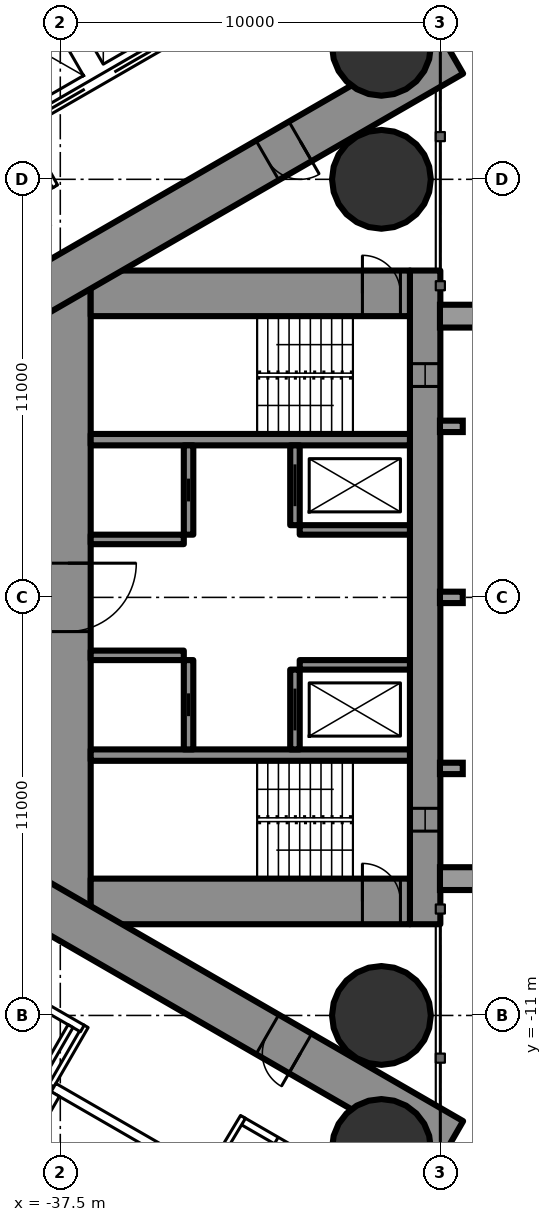
"""IFC4 building model, lengths in metres.
Left out: names, types, materials, properties, quantities, classifications, styles, units other than length and angle.
Written with IfcOpenShell. Run it as: python <this file> out.ifc"""

import sys

from ifc_helpers import new_model, si_unit, direction, frame, frame_2d, origin, origin_2d, place, context, subcontext, project, spatial, rectangle, hollow_circle, extrude, element, fill, save


model = new_model("IFC4")
c1 = context("Model", 3, precision=1e-05, world=origin(), true_north=direction((0.0, 1.0)))
c2 = subcontext(c1, "Body", "Model", "MODEL_VIEW")
j1 = project(units=[si_unit("LENGTHUNIT", "METRE"), si_unit("PLANEANGLEUNIT", "RADIAN")], contexts=[c1])
p1 = place(None, origin())
s1 = spatial("IfcSite", under=j1, at=p1, CompositionType="ELEMENT")
p2 = place(p1, origin())
s2 = spatial("IfcBuilding", under=s1, at=p2, CompositionType="ELEMENT")
p3 = place(p2, frame((0.0, 0.0, 132.6)))
s3 = spatial("IfcBuildingStorey", under=s2, at=p3, CompositionType="ELEMENT", Elevation=132.6)
for number, where, z_axis, x_axis in (
    (1, (-29.05, -11.0, 0.0), (0.0, 0.0, 1.0), (1.0, 0.0, 0.0)),
    (2, (-29.05, 11.0, 0.0), (0.0, 0.0, 1.0), (1.0, 0.0, 0.0)),
    (3, (-29.05, 14.5, 0.0), (0.0, 0.0, 1.0), (1.0, 0.0, 0.0)),
    (4, (-29.05, -14.5, 0.0), (0.0, 0.0, 1.0), (1.0, 0.0, 0.0)),
):
    element("IfcColumn", number, at=place(p3, frame(where, z_axis=z_axis, x_axis=x_axis)), inside=s3, PredefinedType="COLUMN", context=c2, shape_type="SweptSolid", body=[
        extrude(hollow_circle(Radius=1.3, WallThickness=0.1, at=origin_2d()), origin(), (0.0, 0.0, 1.0), 3.5),
    ])
p4 = place(p3, frame((-27.9, 8.6, 0.0), z_axis=(0.0, 0.0, 1.0), x_axis=(0.0, -1.0, 0.0)))
e5 = element("IfcWall", 5, at=p4, inside=s3, PredefinedType="SHEAR", context=c2, shape_type="SweptSolid", body=[
    extrude(rectangle(XDim=17.2, YDim=0.8, at=frame_2d((8.6, 0.0))), origin(), (0.0, 0.0, 1.0), 3.5),
])
p5 = place(p4, frame((2.45, 0.0, 0.6)))
e6 = element("IfcOpeningElement", 6, at=p5, cuts=e5, PredefinedType="OPENING", context=c2, shape_type="SweptSolid", body=[
    extrude(rectangle(XDim=0.6, YDim=2.1, at=frame_2d((0.3, 1.05))), frame((0.0, 0.41, 0.0), z_axis=(0.0, -1.0, 0.0), x_axis=(1.0, 0.0, 0.0)), (0.0, 0.0, 1.0), 0.82),
])
p6 = place(p4, frame((14.15, 0.0, 0.6)))
e7 = element("IfcOpeningElement", 7, at=p6, cuts=e5, PredefinedType="OPENING", context=c2, shape_type="SweptSolid", body=[
    extrude(rectangle(XDim=0.6, YDim=2.1, at=frame_2d((0.3, 1.05))), frame((0.0, 0.41, 0.0), z_axis=(0.0, -1.0, 0.0), x_axis=(1.0, 0.0, 0.0)), (0.0, 0.0, 1.0), 0.82),
])
p7 = place(p3, frame((-37.3, 8.6, 0.0), z_axis=(0.0, 0.0, 1.0), x_axis=(0.0, -1.0, 0.0)))
e8 = element("IfcWall", 8, at=p7, inside=s3, PredefinedType="SHEAR", context=c2, shape_type="SweptSolid", body=[
    extrude(rectangle(XDim=17.2, YDim=1.2, at=frame_2d((8.6, 0.0))), origin(), (0.0, 0.0, 1.0), 3.5),
])
p8 = place(p7, frame((7.7, 0.0, 0.0)))
e9 = element("IfcOpeningElement", 9, at=p8, cuts=e8, PredefinedType="OPENING", context=c2, shape_type="SweptSolid", body=[
    extrude(rectangle(XDim=1.8, YDim=2.2, at=frame_2d((0.9, 1.1))), frame((0.0, 0.61, 0.0), z_axis=(0.0, -1.0, 0.0), x_axis=(1.0, 0.0, 0.0)), (0.0, 0.0, 1.0), 1.22),
])
p9 = place(p3, frame((-28.3, 8.0, 0.0), z_axis=(0.0, 0.0, 1.0), x_axis=(-1.0, 0.0, 0.0)))
e10 = element("IfcWall", 10, at=p9, inside=s3, PredefinedType="SHEAR", context=c2, shape_type="SweptSolid", body=[
    extrude(rectangle(XDim=8.4, YDim=1.2, at=frame_2d((4.2, 0.0))), origin(), (0.0, 0.0, 1.0), 3.5),
])
p10 = place(p9, frame((0.25, 0.0, 0.0)))
e11 = element("IfcOpeningElement", 11, at=p10, cuts=e10, PredefinedType="OPENING", context=c2, shape_type="SweptSolid", body=[
    extrude(rectangle(XDim=1.0, YDim=2.2, at=frame_2d((0.5, 1.1))), frame((0.0, 0.61, 0.0), z_axis=(0.0, -1.0, 0.0), x_axis=(1.0, 0.0, 0.0)), (0.0, 0.0, 1.0), 1.22),
])
p11 = place(p3, frame((-28.3, -8.0, 0.0), z_axis=(0.0, 0.0, 1.0), x_axis=(-1.0, 0.0, 0.0)))
e12 = element("IfcWall", 12, at=p11, inside=s3, PredefinedType="SHEAR", context=c2, shape_type="SweptSolid", body=[
    extrude(rectangle(XDim=8.4, YDim=1.2, at=frame_2d((4.2, 0.0))), origin(), (0.0, 0.0, 1.0), 3.5),
])
p12 = place(p11, frame((0.25, 0.0, 0.0)))
e13 = element("IfcOpeningElement", 13, at=p12, cuts=e12, PredefinedType="OPENING", context=c2, shape_type="SweptSolid", body=[
    extrude(rectangle(XDim=1.0, YDim=2.2, at=frame_2d((0.5, 1.1))), frame((0.0, 0.61, 0.0), z_axis=(0.0, -1.0, 0.0), x_axis=(1.0, 0.0, 0.0)), (0.0, 0.0, 1.0), 1.22),
])
for number, where, z_axis, x_axis in (
    (14, (-28.3, 4.15, 0.0), (0.0, 0.0, 1.0), (-1.0, 0.0, 0.0)),
    (15, (-28.3, -4.15, 0.0), (0.0, 0.0, 1.0), (-1.0, 0.0, 0.0)),
):
    element("IfcWall", number, at=place(p3, frame(where, z_axis=z_axis, x_axis=x_axis)), inside=s3, PredefinedType="SHEAR", context=c2, shape_type="SweptSolid", body=[
        extrude(rectangle(XDim=8.4, YDim=0.3, at=frame_2d((4.2, 0.0))), origin(), (0.0, 0.0, 1.0), 3.5),
    ])
p13 = place(p3, frame((-31.325, 4.0, 0.0), z_axis=(0.0, 0.0, 1.0), x_axis=(0.0, -1.0, 0.0)))
e16 = element("IfcWall", 16, at=p13, inside=s3, PredefinedType="SHEAR", context=c2, shape_type="SweptSolid", body=[
    extrude(rectangle(XDim=2.1, YDim=0.25, at=frame_2d((1.05, 0.0))), origin(), (0.0, 0.0, 1.0), 3.5),
])
p14 = place(p13, frame((0.5, 0.0, 0.0)))
e17 = element("IfcOpeningElement", 17, at=p14, cuts=e16, PredefinedType="OPENING", context=c2, shape_type="SweptSolid", body=[
    extrude(rectangle(XDim=1.1, YDim=2.2, at=frame_2d((0.55, 1.1))), frame((0.0, 0.135, 0.0), z_axis=(0.0, -1.0, 0.0), x_axis=(1.0, 0.0, 0.0)), (0.0, 0.0, 1.0), 0.27),
])
p15 = place(p3, frame((-34.125, 4.0, 0.0), z_axis=(0.0, 0.0, 1.0), x_axis=(0.0, -1.0, 0.0)))
e18 = element("IfcWall", 18, at=p15, inside=s3, PredefinedType="SHEAR", context=c2, shape_type="SweptSolid", body=[
    extrude(rectangle(XDim=2.35, YDim=0.25, at=frame_2d((1.175, 0.0))), origin(), (0.0, 0.0, 1.0), 3.5),
])
p16 = place(p15, frame((0.875, 0.0, 0.0)))
e19 = element("IfcOpeningElement", 19, at=p16, cuts=e18, PredefinedType="OPENING", context=c2, shape_type="SweptSolid", body=[
    extrude(rectangle(XDim=0.6, YDim=2.0, at=frame_2d((0.3, 1.0))), frame((0.0, 0.135, 0.0), z_axis=(0.0, -1.0, 0.0), x_axis=(1.0, 0.0, 0.0)), (0.0, 0.0, 1.0), 0.27),
])
p17 = place(p3, frame((-28.3, 1.775, 0.0), z_axis=(0.0, 0.0, 1.0), x_axis=(-1.0, 0.0, 0.0)))
e20 = element("IfcWall", 20, at=p17, inside=s3, PredefinedType="SHEAR", context=c2, shape_type="SweptSolid", body=[
    extrude(rectangle(XDim=2.9, YDim=0.25, at=frame_2d((1.45, 0.0))), origin(), (0.0, 0.0, 1.0), 3.5),
])
p18 = place(p3, frame((-34.25, 1.525, 0.0), z_axis=(0.0, 0.0, 1.0), x_axis=(-1.0, 0.0, 0.0)))
e21 = element("IfcWall", 21, at=p18, inside=s3, PredefinedType="SHEAR", context=c2, shape_type="SweptSolid", body=[
    extrude(rectangle(XDim=2.45, YDim=0.25, at=frame_2d((1.225, 0.0))), origin(), (0.0, 0.0, 1.0), 3.5),
])
p19 = place(p3, frame((-31.325, -1.9, 0.0), z_axis=(0.0, 0.0, 1.0), x_axis=(0.0, -1.0, 0.0)))
e22 = element("IfcWall", 22, at=p19, inside=s3, PredefinedType="SHEAR", context=c2, shape_type="SweptSolid", body=[
    extrude(rectangle(XDim=2.1, YDim=0.25, at=frame_2d((1.05, 0.0))), origin(), (0.0, 0.0, 1.0), 3.5),
])
p20 = place(p19, frame((0.5, 0.0, 0.0)))
e23 = element("IfcOpeningElement", 23, at=p20, cuts=e22, PredefinedType="OPENING", context=c2, shape_type="SweptSolid", body=[
    extrude(rectangle(XDim=1.1, YDim=2.2, at=frame_2d((0.55, 1.1))), frame((0.0, 0.135, 0.0), z_axis=(0.0, -1.0, 0.0), x_axis=(1.0, 0.0, 0.0)), (0.0, 0.0, 1.0), 0.27),
])
p21 = place(p3, frame((-34.125, -1.65, 0.0), z_axis=(0.0, 0.0, 1.0), x_axis=(0.0, -1.0, 0.0)))
e24 = element("IfcWall", 24, at=p21, inside=s3, PredefinedType="SHEAR", context=c2, shape_type="SweptSolid", body=[
    extrude(rectangle(XDim=2.35, YDim=0.25, at=frame_2d((1.175, 0.0))), origin(), (0.0, 0.0, 1.0), 3.5),
])
p22 = place(p21, frame((0.875, 0.0, 0.0)))
e25 = element("IfcOpeningElement", 25, at=p22, cuts=e24, PredefinedType="OPENING", context=c2, shape_type="SweptSolid", body=[
    extrude(rectangle(XDim=0.6, YDim=2.0, at=frame_2d((0.3, 1.0))), frame((0.0, 0.135, 0.0), z_axis=(0.0, -1.0, 0.0), x_axis=(1.0, 0.0, 0.0)), (0.0, 0.0, 1.0), 0.27),
])
p23 = place(p3, frame((-28.3, -1.775, 0.0), z_axis=(0.0, 0.0, 1.0), x_axis=(-1.0, 0.0, 0.0)))
e26 = element("IfcWall", 26, at=p23, inside=s3, PredefinedType="SHEAR", context=c2, shape_type="SweptSolid", body=[
    extrude(rectangle(XDim=2.9, YDim=0.25, at=frame_2d((1.45, 0.0))), origin(), (0.0, 0.0, 1.0), 3.5),
])
p24 = place(p3, frame((-34.25, -1.525, 0.0), z_axis=(0.0, 0.0, 1.0), x_axis=(-1.0, 0.0, 0.0)))
e27 = element("IfcWall", 27, at=p24, inside=s3, PredefinedType="SHEAR", context=c2, shape_type="SweptSolid", body=[
    extrude(rectangle(XDim=2.45, YDim=0.25, at=frame_2d((1.225, 0.0))), origin(), (0.0, 0.0, 1.0), 3.5),
])
p25 = place(p3, frame((-27.2, 14.3, 0.0), z_axis=(0.0, 0.0, 1.0), x_axis=(-0.866026593062, -0.499997940104, 0.0)))
e28 = element("IfcWall", 28, at=p25, inside=s3, PredefinedType="SHEAR", context=c2, shape_type="SweptSolid", body=[
    extrude(rectangle(XDim=28.946, YDim=1.2, at=frame_2d((14.473, 0.0))), origin(), (0.0, 0.0, 1.0), 3.5),
])
p26 = place(p25, frame((4.6, 0.0, 0.0)))
e29 = element("IfcOpeningElement", 29, at=p26, cuts=e28, PredefinedType="OPENING", context=c2, shape_type="SweptSolid", body=[
    extrude(rectangle(XDim=1.0, YDim=2.2, at=frame_2d((0.5, 1.1))), frame((0.0, 0.61, 0.0), z_axis=(0.0, -1.0, 0.0), x_axis=(1.0, 0.0, 0.0)), (0.0, 0.0, 1.0), 1.22),
])
p27 = place(p25, frame((13.395, 0.0, 0.0)))
e30 = element("IfcOpeningElement", 30, at=p27, cuts=e28, PredefinedType="OPENING", context=c2, shape_type="SweptSolid", body=[
    extrude(rectangle(XDim=1.8, YDim=2.2, at=frame_2d((0.9, 1.1))), frame((0.0, 0.61, 0.0), z_axis=(0.0, -1.0, 0.0), x_axis=(1.0, 0.0, 0.0)), (0.0, 0.0, 1.0), 1.22),
])
p28 = place(p3, frame((-27.2, -14.3, 0.0), z_axis=(0.0, 0.0, 1.0), x_axis=(-0.866024021859, 0.500002393557, 0.0)))
e31 = element("IfcWall", 31, at=p28, inside=s3, PredefinedType="SHEAR", context=c2, shape_type="SweptSolid", body=[
    extrude(rectangle(XDim=27.907, YDim=1.2, at=frame_2d((13.954, 0.0))), origin(), (0.0, 0.0, 1.0), 3.5),
])
p29 = place(p28, frame((4.6, 0.0, 0.0)))
e32 = element("IfcOpeningElement", 32, at=p29, cuts=e31, PredefinedType="OPENING", context=c2, shape_type="SweptSolid", body=[
    extrude(rectangle(XDim=1.0, YDim=2.2, at=frame_2d((0.5, 1.1))), frame((0.0, 0.61, 0.0), z_axis=(0.0, -1.0, 0.0), x_axis=(1.0, 0.0, 0.0)), (0.0, 0.0, 1.0), 1.22),
])
p30 = place(p28, frame((13.395, 0.0, 0.0)))
e33 = element("IfcOpeningElement", 33, at=p30, cuts=e31, PredefinedType="OPENING", context=c2, shape_type="SweptSolid", body=[
    extrude(rectangle(XDim=1.8, YDim=2.2, at=frame_2d((0.9, 1.1))), frame((0.0, 0.61, 0.0), z_axis=(0.0, -1.0, 0.0), x_axis=(1.0, 0.0, 0.0)), (0.0, 0.0, 1.0), 1.22),
])
p31 = place(p3, frame((-37.7, 10.894, 0.0), z_axis=(0.0, 0.0, 1.0), x_axis=(-0.866027905338, -0.499995667157, 0.0)))
e34 = element("IfcWall", 34, at=p31, inside=s3, PredefinedType="PARTITIONING", context=c2, shape_type="SweptSolid", body=[
    extrude(rectangle(XDim=21.787, YDim=0.2, at=frame_2d((10.894, 0.0))), origin(), (0.0, 0.0, 1.0), 3.25),
])
p32 = place(p31, frame((17.711, 0.0, 0.0)))
e35 = element("IfcOpeningElement", 35, at=p32, cuts=e34, PredefinedType="OPENING", context=c2, shape_type="SweptSolid", body=[
    extrude(rectangle(XDim=0.95, YDim=2.2, at=frame_2d((0.475, 1.1))), frame((0.0, 0.11, 0.0), z_axis=(0.0, -1.0, 0.0), x_axis=(1.0, 0.0, 0.0)), (0.0, 0.0, 1.0), 0.22),
])
p33 = place(p31, frame((19.399, 0.0, 0.0)))
e36 = element("IfcOpeningElement", 36, at=p33, cuts=e34, PredefinedType="OPENING", context=c2, shape_type="SweptSolid", body=[
    extrude(rectangle(XDim=1.8, YDim=2.2, at=frame_2d((0.9, 1.1))), frame((0.0, 0.11, 0.0), z_axis=(0.0, -1.0, 0.0), x_axis=(1.0, 0.0, 0.0)), (0.0, 0.0, 1.0), 0.22),
])
p34 = place(p31, frame((0.6, 0.0, 0.0)))
e37 = element("IfcOpeningElement", 37, at=p34, cuts=e34, PredefinedType="OPENING", context=c2, shape_type="SweptSolid", body=[
    extrude(rectangle(XDim=0.95, YDim=2.2, at=frame_2d((0.475, 1.1))), frame((0.0, 0.11, 0.0), z_axis=(0.0, -1.0, 0.0), x_axis=(1.0, 0.0, 0.0)), (0.0, 0.0, 1.0), 0.22),
])
p35 = place(p3, frame((-27.572, -16.741, 0.0), z_axis=(0.0, 0.0, 1.0), x_axis=(-0.866024464444, 0.500001626982, 0.0)))
e38 = element("IfcWall", 38, at=p35, inside=s3, PredefinedType="PARTITIONING", context=c2, shape_type="SweptSolid", body=[
    extrude(rectangle(XDim=5.955, YDim=0.2, at=frame_2d((2.978, 0.0))), origin(), (0.0, 0.0, 1.0), 3.25),
])
p36 = place(p35, frame((3.95, 0.0, 0.0)))
e39 = element("IfcOpeningElement", 39, at=p36, cuts=e38, PredefinedType="OPENING", context=c2, shape_type="SweptSolid", body=[
    extrude(rectangle(XDim=0.95, YDim=2.2, at=frame_2d((0.475, 1.1))), frame((0.0, 0.11, 0.0), z_axis=(0.0, -1.0, 0.0), x_axis=(1.0, 0.0, 0.0)), (0.0, 0.0, 1.0), 0.22),
])
p37 = place(p3, frame((-38.513, 12.392, 0.0), z_axis=(0.0, 0.0, 1.0), x_axis=(0.485585508183, -0.874189175317, 0.0)))
e40 = element("IfcWall", 40, at=p37, inside=s3, PredefinedType="PARTITIONING", context=c2, shape_type="SweptSolid", body=[
    extrude(rectangle(XDim=1.805, YDim=0.15, at=frame_2d((0.902, 0.0))), origin(), (0.0, 0.0, 1.0), 3.25),
])
p38 = place(p3, frame((-36.831, -11.28, 0.0), z_axis=(0.0, 0.0, 1.0), x_axis=(-0.499937177781, -0.866061671171, 0.0)))
e41 = element("IfcWall", 41, at=p38, inside=s3, PredefinedType="PARTITIONING", context=c2, shape_type="SweptSolid", body=[
    extrude(rectangle(XDim=1.804, YDim=0.15, at=frame_2d((0.902, 0.0))), origin(), (0.0, 0.0, 1.0), 3.25),
])
p39 = place(p3, frame((-33.621, -15.218, 0.0), z_axis=(0.0, 0.0, 1.0), x_axis=(0.514336634837, 0.857588377991, 0.0)))
e42 = element("IfcWall", 42, at=p39, inside=s3, PredefinedType="PARTITIONING", context=c2, shape_type="SweptSolid", body=[
    extrude(rectangle(XDim=1.805, YDim=0.15, at=frame_2d((0.903, 0.0))), origin(), (0.0, 0.0, 1.0), 3.25),
])
p40 = place(p3, frame((-36.92, -11.344, 0.0), z_axis=(0.0, 0.0, 1.0), x_axis=(-0.866027897759, 0.499995680284, 0.0)))
e43 = element("IfcWall", 43, at=p40, inside=s3, PredefinedType="PARTITIONING", context=c2, shape_type="SweptSolid", body=[
    extrude(rectangle(XDim=11.731, YDim=0.2, at=frame_2d((5.865, 0.0))), origin(), (0.0, 0.0, 1.0), 3.25),
])
p41 = place(p40, frame((3.35, 0.0, 0.0)))
e44 = element("IfcOpeningElement", 44, at=p41, cuts=e43, PredefinedType="OPENING", context=c2, shape_type="SweptSolid", body=[
    extrude(rectangle(XDim=1.0, YDim=2.2, at=frame_2d((0.5, 1.1))), frame((0.0, 0.11, 0.0), z_axis=(0.0, -1.0, 0.0), x_axis=(1.0, 0.0, 0.0)), (0.0, 0.0, 1.0), 0.22),
])
p42 = place(p3, frame((-37.23, -11.281, 0.0), z_axis=(0.0, 0.0, 1.0), x_axis=(-0.500049511043, -0.865996816683, 0.0)))
e45 = element("IfcWall", 45, at=p42, inside=s3, PredefinedType="PARTITIONING", context=c2, shape_type="SweptSolid", body=[
    extrude(rectangle(XDim=2.8, YDim=0.15, at=frame_2d((1.4, 0.0))), origin(), (0.0, 0.0, 1.0), 3.25),
])
p43 = place(p3, frame((-31.01, 16.747, 0.0), z_axis=(0.0, 0.0, 1.0), x_axis=(-0.866028165386, -0.499995216735, 0.0)))
e46 = element("IfcWall", 46, at=p43, inside=s3, PredefinedType="PARTITIONING", context=c2, shape_type="SweptSolid", body=[
    extrude(rectangle(XDim=8.6, YDim=0.25, at=frame_2d((4.3, 0.0))), origin(), (0.0, 0.0, 1.0), 3.25),
])
p44 = place(p43, frame((0.75, 0.0, 0.0)))
e47 = element("IfcOpeningElement", 47, at=p44, cuts=e46, PredefinedType="OPENING", context=c2, shape_type="SweptSolid", body=[
    extrude(rectangle(XDim=1.1, YDim=2.2, at=frame_2d((0.55, 1.1))), frame((0.0, 0.135, 0.0), z_axis=(0.0, -1.0, 0.0), x_axis=(1.0, 0.0, 0.0)), (0.0, 0.0, 1.0), 0.27),
])
p45 = place(p43, frame((2.75, 0.0, 0.0)))
e48 = element("IfcOpeningElement", 48, at=p45, cuts=e46, PredefinedType="OPENING", context=c2, shape_type="SweptSolid", body=[
    extrude(rectangle(XDim=1.1, YDim=2.2, at=frame_2d((0.55, 1.1))), frame((0.0, 0.135, 0.0), z_axis=(0.0, -1.0, 0.0), x_axis=(1.0, 0.0, 0.0)), (0.0, 0.0, 1.0), 0.27),
])
p46 = place(p43, frame((4.75, 0.0, 0.0)))
e49 = element("IfcOpeningElement", 49, at=p46, cuts=e46, PredefinedType="OPENING", context=c2, shape_type="SweptSolid", body=[
    extrude(rectangle(XDim=1.1, YDim=2.2, at=frame_2d((0.55, 1.1))), frame((0.0, 0.135, 0.0), z_axis=(0.0, -1.0, 0.0), x_axis=(1.0, 0.0, 0.0)), (0.0, 0.0, 1.0), 0.27),
])
p47 = place(p43, frame((6.75, 0.0, 0.0)))
e50 = element("IfcOpeningElement", 50, at=p47, cuts=e46, PredefinedType="OPENING", context=c2, shape_type="SweptSolid", body=[
    extrude(rectangle(XDim=1.1, YDim=2.2, at=frame_2d((0.55, 1.1))), frame((0.0, 0.135, 0.0), z_axis=(0.0, -1.0, 0.0), x_axis=(1.0, 0.0, 0.0)), (0.0, 0.0, 1.0), 0.27),
])
p48 = place(p3, frame((-33.696, -15.197, 0.0), z_axis=(0.0, 0.0, 1.0), x_axis=(-0.865976953817, 0.500083908417, 0.0)))
e51 = element("IfcWall", 51, at=p48, inside=s3, PredefinedType="PARTITIONING", context=c2, shape_type="SweptSolid", body=[
    extrude(rectangle(XDim=4.599, YDim=0.25, at=frame_2d((2.3, 0.0))), origin(), (0.0, 0.0, 1.0), 3.25),
])
p49 = place(p3, frame((-37.633, -13.068, 0.0), z_axis=(0.0, 0.0, 1.0), x_axis=(-0.499872130319, -0.866099216793, 0.0)))
e52 = element("IfcWall", 52, at=p49, inside=s3, PredefinedType="PARTITIONING", context=c2, shape_type="SweptSolid", body=[
    extrude(rectangle(XDim=3.2, YDim=0.25, at=frame_2d((1.6, 0.0))), origin(), (0.0, 0.0, 1.0), 3.25),
])
p50 = place(p36, origin())
e53 = element("IfcDoor", 53, at=p50, inside=s3, OperationType="SINGLE_SWING_LEFT", PredefinedType="DOOR", context=c2, shape_type="SweptSolid", body=[
    extrude(rectangle(XDim=0.95, YDim=2.2, at=frame_2d((0.475, 1.1))), frame((0.0, 0.025, 0.0), z_axis=(0.0, -1.0, 0.0), x_axis=(1.0, 0.0, 0.0)), (0.0, 0.0, 1.0), 0.05),
])
fill(e39, e53)
p51 = place(p26, origin())
e54 = element("IfcDoor", 54, at=p51, inside=s3, OperationType="SINGLE_SWING_LEFT", PredefinedType="DOOR", context=c2, shape_type="SweptSolid", body=[
    extrude(rectangle(XDim=1.0, YDim=2.2, at=frame_2d((0.5, 1.1))), frame((0.0, 0.025, 0.0), z_axis=(0.0, -1.0, 0.0), x_axis=(1.0, 0.0, 0.0)), (0.0, 0.0, 1.0), 0.05),
])
fill(e29, e54)
p52 = place(p29, origin())
e55 = element("IfcDoor", 55, at=p52, inside=s3, OperationType="SINGLE_SWING_LEFT", PredefinedType="DOOR", context=c2, shape_type="SweptSolid", body=[
    extrude(rectangle(XDim=1.0, YDim=2.2, at=frame_2d((0.5, 1.1))), frame((0.0, 0.025, 0.0), z_axis=(0.0, -1.0, 0.0), x_axis=(1.0, 0.0, 0.0)), (0.0, 0.0, 1.0), 0.05),
])
fill(e32, e55)
p53 = place(p8, origin())
e56 = element("IfcDoor", 56, at=p53, inside=s3, OperationType="DOUBLE_DOOR_SINGLE_SWING", PredefinedType="DOOR", context=c2, shape_type="SweptSolid", body=[
    extrude(rectangle(XDim=1.8, YDim=2.2, at=frame_2d((0.9, 1.1))), frame((0.0, 0.025, 0.0), z_axis=(0.0, -1.0, 0.0), x_axis=(1.0, 0.0, 0.0)), (0.0, 0.0, 1.0), 0.05),
])
fill(e9, e56)
p54 = place(p10, origin())
e57 = element("IfcDoor", 57, at=p54, inside=s3, OperationType="SINGLE_SWING_RIGHT", PredefinedType="DOOR", context=c2, shape_type="SweptSolid", body=[
    extrude(rectangle(XDim=1.0, YDim=2.2, at=frame_2d((0.5, 1.1))), frame((0.0, 0.025, 0.0), z_axis=(0.0, -1.0, 0.0), x_axis=(1.0, 0.0, 0.0)), (0.0, 0.0, 1.0), 0.05),
])
fill(e11, e57)
p55 = place(p12, origin())
e58 = element("IfcDoor", 58, at=p55, inside=s3, OperationType="SINGLE_SWING_RIGHT", PredefinedType="DOOR", context=c2, shape_type="SweptSolid", body=[
    extrude(rectangle(XDim=1.0, YDim=2.2, at=frame_2d((0.5, 1.1))), frame((0.0, 0.025, 0.0), z_axis=(0.0, -1.0, 0.0), x_axis=(1.0, 0.0, 0.0)), (0.0, 0.0, 1.0), 0.05),
])
fill(e13, e58)
p56 = place(p14, origin())
e59 = element("IfcDoor", 59, at=p56, inside=s3, OperationType="SLIDING_TO_LEFT", PredefinedType="USERDEFINED", context=c2, shape_type="SweptSolid", body=[
    extrude(rectangle(XDim=1.1, YDim=2.2, at=frame_2d((0.55, 1.1))), frame((0.0, 0.025, 0.0), z_axis=(0.0, -1.0, 0.0), x_axis=(1.0, 0.0, 0.0)), (0.0, 0.0, 1.0), 0.05),
])
fill(e17, e59)
p57 = place(p20, origin())
e60 = element("IfcDoor", 60, at=p57, inside=s3, OperationType="SLIDING_TO_LEFT", PredefinedType="USERDEFINED", context=c2, shape_type="SweptSolid", body=[
    extrude(rectangle(XDim=1.1, YDim=2.2, at=frame_2d((0.55, 1.1))), frame((0.0, 0.025, 0.0), z_axis=(0.0, -1.0, 0.0), x_axis=(1.0, 0.0, 0.0)), (0.0, 0.0, 1.0), 0.05),
])
fill(e23, e60)
p58 = place(p16, origin())
e61 = element("IfcDoor", 61, at=p58, inside=s3, OperationType="SLIDING_TO_LEFT", PredefinedType="DOOR", context=c2, shape_type="SweptSolid", body=[
    extrude(rectangle(XDim=0.6, YDim=2.0, at=frame_2d((0.3, 1.0))), frame((0.0, 0.025, 0.0), z_axis=(0.0, -1.0, 0.0), x_axis=(1.0, 0.0, 0.0)), (0.0, 0.0, 1.0), 0.05),
])
fill(e19, e61)
p59 = place(p22, origin())
e62 = element("IfcDoor", 62, at=p59, inside=s3, OperationType="SLIDING_TO_LEFT", PredefinedType="DOOR", context=c2, shape_type="SweptSolid", body=[
    extrude(rectangle(XDim=0.6, YDim=2.0, at=frame_2d((0.3, 1.0))), frame((0.0, 0.025, 0.0), z_axis=(0.0, -1.0, 0.0), x_axis=(1.0, 0.0, 0.0)), (0.0, 0.0, 1.0), 0.05),
])
fill(e25, e62)
p60 = place(p46, origin())
e63 = element("IfcDoor", 63, at=p60, inside=s3, OperationType="DOUBLE_DOOR_SLIDING", PredefinedType="USERDEFINED", context=c2, shape_type="SweptSolid", body=[
    extrude(rectangle(XDim=1.1, YDim=2.2, at=frame_2d((0.55, 1.1))), frame((0.0, 0.025, 0.0), z_axis=(0.0, -1.0, 0.0), x_axis=(1.0, 0.0, 0.0)), (0.0, 0.0, 1.0), 0.05),
])
fill(e49, e63)
p61 = place(p47, origin())
e64 = element("IfcDoor", 64, at=p61, inside=s3, OperationType="DOUBLE_DOOR_SLIDING", PredefinedType="USERDEFINED", context=c2, shape_type="SweptSolid", body=[
    extrude(rectangle(XDim=1.1, YDim=2.2, at=frame_2d((0.55, 1.1))), frame((0.0, 0.025, 0.0), z_axis=(0.0, -1.0, 0.0), x_axis=(1.0, 0.0, 0.0)), (0.0, 0.0, 1.0), 0.05),
])
fill(e50, e64)
p62 = place(p5, origin())
e65 = element("IfcWindow", 65, at=p62, inside=s3, PartitioningType="SINGLE_PANEL", PredefinedType="WINDOW", context=c2, shape_type="SweptSolid", body=[
    extrude(rectangle(XDim=0.6, YDim=2.1, at=frame_2d((0.3, 1.05))), frame((0.0, 0.03, 0.0), z_axis=(0.0, -1.0, 0.0), x_axis=(1.0, 0.0, 0.0)), (0.0, 0.0, 1.0), 0.06),
])
fill(e6, e65)
p63 = place(p6, origin())
e66 = element("IfcWindow", 66, at=p63, inside=s3, PartitioningType="SINGLE_PANEL", PredefinedType="WINDOW", context=c2, shape_type="SweptSolid", body=[
    extrude(rectangle(XDim=0.6, YDim=2.1, at=frame_2d((0.3, 1.05))), frame((0.0, 0.03, 0.0), z_axis=(0.0, -1.0, 0.0), x_axis=(1.0, 0.0, 0.0)), (0.0, 0.0, 1.0), 0.06),
])
fill(e7, e66)
save(model, sys.argv[1])
